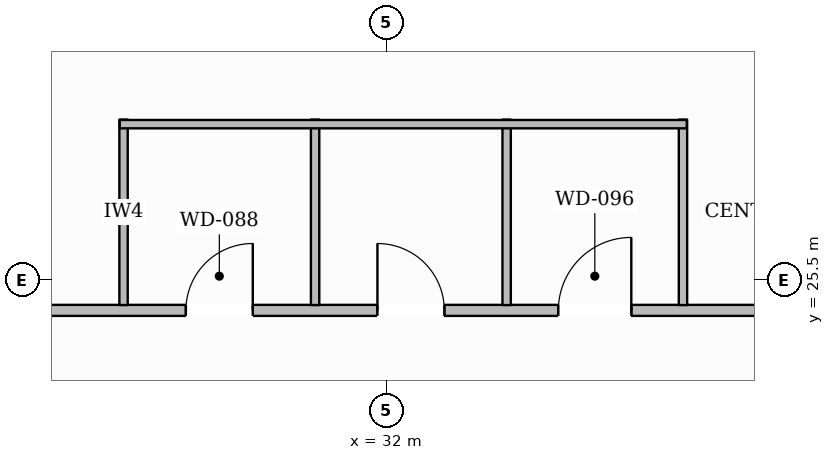
"""IFC4 building model, lengths in metres.
Left out: names, types, materials, properties, quantities, classifications, styles, units other than length and angle.
Written with IfcOpenShell. Run it as: python <this file> out.ifc"""

import sys

from ifc_helpers import new_model, si_unit, direction, frame, frame_2d, origin, place, context, subcontext, project, spatial, rectangle, extrude, element, fill, save


model = new_model("IFC4")
c1 = context("Model", 3, precision=1e-05, world=origin(), true_north=direction((0.0, 1.0)))
c2 = subcontext(c1, "Body", "Model", "MODEL_VIEW")
j1 = project(units=[si_unit("LENGTHUNIT", "METRE"), si_unit("PLANEANGLEUNIT", "RADIAN")], contexts=[c1])
p1 = place(None, origin())
s1 = spatial("IfcSite", under=j1, at=p1, CompositionType="ELEMENT")
p2 = place(p1, origin())
s2 = spatial("IfcBuilding", under=s1, at=p2, CompositionType="ELEMENT")
p3 = place(p2, frame((0.0, 0.0, 44.5)))
s3 = spatial("IfcBuildingStorey", under=s2, at=p3, CompositionType="ELEMENT", Elevation=44.5)
p4 = place(p3, frame((13.26, 14.434, 0.0), z_axis=(0.0, 0.0, 1.0), x_axis=(0.497388557453, 0.867527880194, 0.0)))
e1 = element("IfcWall", 1, at=p4, inside=s3, PredefinedType="STANDARD", context=c2, shape_type="SweptSolid", body=[
    extrude(rectangle(XDim=34.723, YDim=0.38, at=frame_2d((17.361, 0.0))), origin(), (0.0, 0.0, 1.0), 2.97),
])
p5 = place(p4, frame((30.604, 0.0, 0.65)))
e2 = element("IfcOpeningElement", 2, at=p5, cuts=e1, PredefinedType="OPENING", context=c2, shape_type="SweptSolid", body=[
    extrude(rectangle(XDim=1.65, YDim=1.75, at=frame_2d((0.825, 0.875))), frame((0.0, 0.2, 0.0), z_axis=(0.0, -1.0, 0.0), x_axis=(1.0, 0.0, 0.0)), (0.0, 0.0, 1.0), 0.4),
])
p6 = place(p4, frame((24.976, 0.0, 0.65)))
e3 = element("IfcOpeningElement", 3, at=p6, cuts=e1, PredefinedType="OPENING", context=c2, shape_type="SweptSolid", body=[
    extrude(rectangle(XDim=1.65, YDim=1.75, at=frame_2d((0.825, 0.875))), frame((0.0, 0.2, 0.0), z_axis=(0.0, -1.0, 0.0), x_axis=(1.0, 0.0, 0.0)), (0.0, 0.0, 1.0), 0.4),
])
p7 = place(p4, frame((13.721, 0.0, 0.65)))
e4 = element("IfcOpeningElement", 4, at=p7, cuts=e1, PredefinedType="OPENING", context=c2, shape_type="SweptSolid", body=[
    extrude(rectangle(XDim=1.65, YDim=1.75, at=frame_2d((0.825, 0.875))), frame((0.0, 0.2, 0.0), z_axis=(0.0, -1.0, 0.0), x_axis=(1.0, 0.0, 0.0)), (0.0, 0.0, 1.0), 0.4),
])
p8 = place(p4, frame((8.094, 0.0, 0.65)))
e5 = element("IfcOpeningElement", 5, at=p8, cuts=e1, PredefinedType="OPENING", context=c2, shape_type="SweptSolid", body=[
    extrude(rectangle(XDim=1.65, YDim=1.75, at=frame_2d((0.825, 0.875))), frame((0.0, 0.2, 0.0), z_axis=(0.0, -1.0, 0.0), x_axis=(1.0, 0.0, 0.0)), (0.0, 0.0, 1.0), 0.4),
])
p9 = place(p4, frame((2.466, 0.0, 0.65)))
e6 = element("IfcOpeningElement", 6, at=p9, cuts=e1, PredefinedType="OPENING", context=c2, shape_type="SweptSolid", body=[
    extrude(rectangle(XDim=1.65, YDim=1.75, at=frame_2d((0.825, 0.875))), frame((0.0, 0.2, 0.0), z_axis=(0.0, -1.0, 0.0), x_axis=(1.0, 0.0, 0.0)), (0.0, 0.0, 1.0), 0.4),
])
p10 = place(p3, frame((25.98, 25.1, 0.0), z_axis=(0.0, 0.0, 1.0), x_axis=(1.0, 0.0, 0.0)))
e7 = element("IfcWall", 7, at=p10, inside=s3, PredefinedType="PARTITIONING", context=c2, shape_type="SweptSolid", body=[
    extrude(rectangle(XDim=11.02, YDim=0.145, at=frame_2d((5.51, 0.0))), origin(), (0.0, 0.0, 1.0), 3.59),
])
p11 = place(p10, frame((3.38, 0.0, 0.0)))
e8 = element("IfcOpeningElement", 8, at=p11, cuts=e7, PredefinedType="OPENING", context=c2, shape_type="SweptSolid", body=[
    extrude(rectangle(XDim=0.88, YDim=2.1, at=frame_2d((0.44, 1.05))), frame((0.0, 0.083, 0.0), z_axis=(0.0, -1.0, 0.0), x_axis=(1.0, 0.0, 0.0)), (0.0, 0.0, 1.0), 0.165),
])
p12 = place(p10, frame((5.9, 0.0, 0.0)))
e9 = element("IfcOpeningElement", 9, at=p12, cuts=e7, PredefinedType="OPENING", context=c2, shape_type="SweptSolid", body=[
    extrude(rectangle(XDim=0.88, YDim=2.1, at=frame_2d((0.44, 1.05))), frame((0.0, 0.083, 0.0), z_axis=(0.0, -1.0, 0.0), x_axis=(1.0, 0.0, 0.0)), (0.0, 0.0, 1.0), 0.165),
])
p13 = place(p10, frame((8.28, 0.0, 0.0)))
e10 = element("IfcOpeningElement", 10, at=p13, cuts=e7, PredefinedType="OPENING", context=c2, shape_type="SweptSolid", body=[
    extrude(rectangle(XDim=0.96, YDim=2.1, at=frame_2d((0.48, 1.05))), frame((0.0, 0.083, 0.0), z_axis=(0.0, -1.0, 0.0), x_axis=(1.0, 0.0, 0.0)), (0.0, 0.0, 1.0), 0.165),
])
for number, where, z_axis, x_axis in (
    (11, (28.54, 25.17, 0.0), (0.0, 0.0, 1.0), (0.0, 1.0, 0.0)),
    (12, (31.06, 25.17, 0.0), (0.0, 0.0, 1.0), (0.0, 1.0, 0.0)),
    (13, (33.58, 25.17, 0.0), (0.0, 0.0, 1.0), (0.0, 1.0, 0.0)),
    (14, (35.9, 25.17, 0.0), (0.0, 0.0, 1.0), (0.0, 1.0, 0.0)),
):
    element("IfcWall", number, at=place(p3, frame(where, z_axis=z_axis, x_axis=x_axis)), inside=s3, PredefinedType="PLUMBINGWALL", context=c2, shape_type="SweptSolid", body=[
        extrude(rectangle(XDim=2.44, YDim=0.11, at=frame_2d((1.22, 0.0))), origin(), (0.0, 0.0, 1.0), 3.59),
    ])
p14 = place(p3, frame((28.49, 27.55, 0.0), z_axis=(0.0, 0.0, 1.0), x_axis=(1.0, 0.0, 0.0)))
e15 = element("IfcWall", 15, at=p14, inside=s3, PredefinedType="PLUMBINGWALL", context=c2, shape_type="SweptSolid", body=[
    extrude(rectangle(XDim=7.46, YDim=0.11, at=frame_2d((3.73, 0.0))), origin(), (0.0, 0.0, 1.0), 3.59),
])
p15 = place(p11, origin())
e16 = element("IfcDoor", 16, at=p15, inside=s3, OperationType="SINGLE_SWING_RIGHT", PredefinedType="DOOR", context=c2, shape_type="SweptSolid", body=[
    extrude(rectangle(XDim=0.88, YDim=2.1, at=frame_2d((0.44, 1.05))), frame((0.0, 0.025, 0.0), z_axis=(0.0, -1.0, 0.0), x_axis=(1.0, 0.0, 0.0)), (0.0, 0.0, 1.0), 0.05),
])
fill(e8, e16)
p16 = place(p12, origin())
e17 = element("IfcDoor", 17, at=p16, inside=s3, OperationType="SINGLE_SWING_LEFT", PredefinedType="DOOR", context=c2, shape_type="SweptSolid", body=[
    extrude(rectangle(XDim=0.88, YDim=2.1, at=frame_2d((0.44, 1.05))), frame((0.0, 0.025, 0.0), z_axis=(0.0, -1.0, 0.0), x_axis=(1.0, 0.0, 0.0)), (0.0, 0.0, 1.0), 0.05),
])
fill(e9, e17)
p17 = place(p13, origin())
e18 = element("IfcDoor", 18, at=p17, inside=s3, OperationType="SINGLE_SWING_RIGHT", PredefinedType="DOOR", context=c2, shape_type="SweptSolid", body=[
    extrude(rectangle(XDim=0.96, YDim=2.1, at=frame_2d((0.48, 1.05))), frame((0.0, 0.025, 0.0), z_axis=(0.0, -1.0, 0.0), x_axis=(1.0, 0.0, 0.0)), (0.0, 0.0, 1.0), 0.05),
])
fill(e10, e18)
save(model, sys.argv[1])
